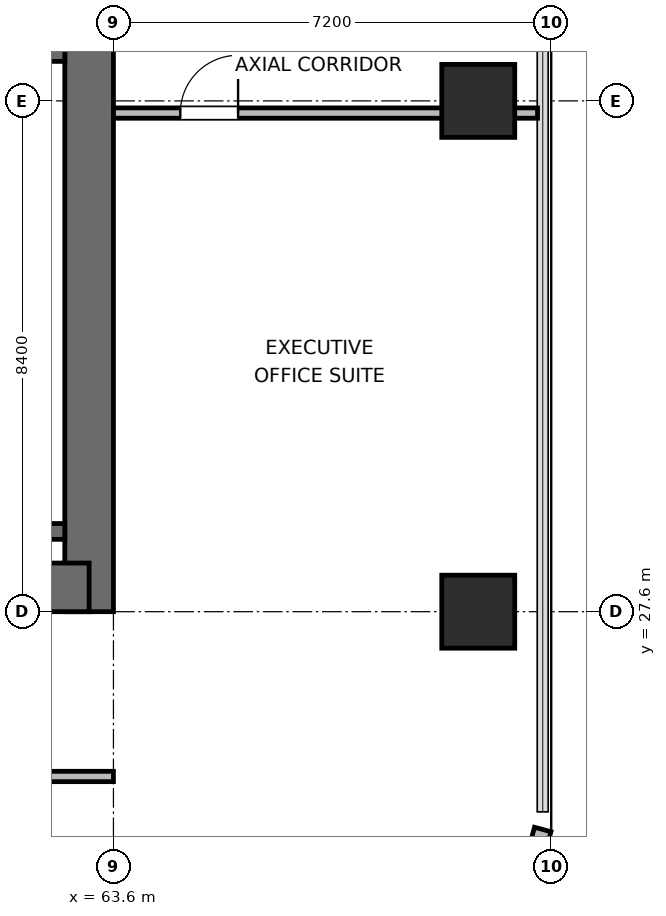
"""IFC4 building model, lengths in metres.
Left out: names, types, materials, properties, quantities, classifications, styles, units other than length and angle.
Written with IfcOpenShell. Run it as: python <this file> out.ifc"""

import sys

from ifc_helpers import new_model, si_unit, direction, frame, frame_2d, origin, origin_2d, place, context, subcontext, project, spatial, rectangle, extrude, element, fill, save


model = new_model("IFC4")
c1 = context("Model", 3, precision=1e-05, world=origin(), true_north=direction((0.0, 1.0)))
c2 = subcontext(c1, "Body", "Model", "MODEL_VIEW")
j1 = project(units=[si_unit("LENGTHUNIT", "METRE"), si_unit("PLANEANGLEUNIT", "RADIAN")], contexts=[c1])
p1 = place(None, origin())
s1 = spatial("IfcSite", under=j1, at=p1, CompositionType="ELEMENT")
p2 = place(p1, origin())
s2 = spatial("IfcBuilding", under=s1, at=p2, CompositionType="ELEMENT")
p3 = place(p2, frame((0.0, 0.0, 162.3)))
s3 = spatial("IfcBuildingStorey", under=s2, at=p3, CompositionType="ELEMENT", Elevation=162.3)
p4 = place(p3, frame((63.2, 27.6, 0.0), z_axis=(0.0, 0.0, 1.0), x_axis=(0.0, 1.0, 0.0)))
e1 = element("IfcWall", 1, at=p4, inside=s3, PredefinedType="SHEAR", context=c2, shape_type="SweptSolid", body=[
    extrude(rectangle(XDim=16.8, YDim=0.8, at=frame_2d((8.4, 0.0))), origin(), (0.0, 0.0, 1.0), 3.9),
])
p5 = place(p3, frame((54.0, 28.0, 0.0), z_axis=(0.0, 0.0, 1.0), x_axis=(1.0, 0.0, 0.0)))
e2 = element("IfcWall", 2, at=p5, inside=s3, PredefinedType="SHEAR", context=c2, shape_type="SweptSolid", body=[
    extrude(rectangle(XDim=9.2, YDim=0.8, at=frame_2d((4.6, 0.0))), origin(), (0.0, 0.0, 1.0), 3.9),
])
p6 = place(p5, frame((3.975, 0.0, 0.0)))
e3 = element("IfcOpeningElement", 3, at=p6, cuts=e2, PredefinedType="OPENING", context=c2, shape_type="SweptSolid", body=[
    extrude(rectangle(XDim=1.05, YDim=2.04, at=frame_2d((0.525, 1.02))), frame((0.0, 0.41, 0.0), z_axis=(0.0, -1.0, 0.0), x_axis=(1.0, 0.0, 0.0)), (0.0, 0.0, 1.0), 0.82),
])
for number, where, z_axis, x_axis in (
    (4, (58.89, 28.92, 0.0), (0.0, 0.0, 1.0), (1.0, 0.0, 0.0)),
    (5, (58.89, 36.78, 0.0), (0.0, 0.0, 1.0), (1.0, 0.0, 0.0)),
):
    element("IfcWall", number, at=place(p3, frame(where, z_axis=z_axis, x_axis=x_axis)), inside=s3, PredefinedType="SHEAR", context=c2, shape_type="SweptSolid", body=[
        extrude(rectangle(XDim=3.91, YDim=0.26, at=frame_2d((1.955, 0.0))), origin(), (0.0, 0.0, 1.0), 3.9),
    ])
for number, where, z_axis, x_axis in (
    (6, (69.6, 27.6, 0.0), (0.0, 0.0, 1.0), (1.0, 0.0, 0.0)),
    (7, (69.6, 36.0, 0.0), (0.0, 0.0, 1.0), (1.0, 0.0, 0.0)),
):
    element("IfcColumn", number, at=place(p3, frame(where, z_axis=z_axis, x_axis=x_axis)), inside=s3, PredefinedType="COLUMN", context=c2, shape_type="SweptSolid", body=[
        extrude(rectangle(XDim=1.2, YDim=1.2, at=origin_2d()), origin(), (0.0, 0.0, 1.0), 3.9),
    ])
p7 = place(p3, frame((70.66, 24.018, 0.0), z_axis=(0.0, 0.0, 1.0), x_axis=(-0.258672222976, -0.9659651552, 0.0)))
e8 = element("IfcWall", 8, at=p7, inside=s3, PredefinedType="SOLIDWALL", context=c2, shape_type="SweptSolid", body=[
    extrude(rectangle(XDim=2.739, YDim=0.28, at=frame_2d((1.37, 0.0))), origin(), (0.0, 0.0, 1.0), 3.68),
])
p8 = place(p3, frame((29.8, 24.89, 0.0), z_axis=(0.0, 0.0, 1.0), x_axis=(1.0, 0.0, 0.0)))
e9 = element("IfcWall", 9, at=p8, inside=s3, PredefinedType="PARTITIONING", context=c2, shape_type="SweptSolid", body=[
    extrude(rectangle(XDim=33.8, YDim=0.17, at=frame_2d((16.9, 0.0))), origin(), (0.0, 0.0, 1.0), 3.68),
])
p9 = place(p8, frame((2.37, 0.0, 0.0)))
e10 = element("IfcOpeningElement", 10, at=p9, cuts=e9, PredefinedType="OPENING", context=c2, shape_type="SweptSolid", body=[
    extrude(rectangle(XDim=0.95, YDim=2.04, at=frame_2d((0.475, 1.02))), frame((0.0, 0.095, 0.0), z_axis=(0.0, -1.0, 0.0), x_axis=(1.0, 0.0, 0.0)), (0.0, 0.0, 1.0), 0.19),
])
p10 = place(p8, frame((7.455, 0.0, 0.0)))
e11 = element("IfcOpeningElement", 11, at=p10, cuts=e9, PredefinedType="OPENING", context=c2, shape_type="SweptSolid", body=[
    extrude(rectangle(XDim=0.95, YDim=2.04, at=frame_2d((0.475, 1.02))), frame((0.0, 0.095, 0.0), z_axis=(0.0, -1.0, 0.0), x_axis=(1.0, 0.0, 0.0)), (0.0, 0.0, 1.0), 0.19),
])
p11 = place(p8, frame((11.51, 0.0, 0.0)))
e12 = element("IfcOpeningElement", 12, at=p11, cuts=e9, PredefinedType="OPENING", context=c2, shape_type="SweptSolid", body=[
    extrude(rectangle(XDim=0.95, YDim=2.04, at=frame_2d((0.475, 1.02))), frame((0.0, 0.095, 0.0), z_axis=(0.0, -1.0, 0.0), x_axis=(1.0, 0.0, 0.0)), (0.0, 0.0, 1.0), 0.19),
])
p12 = place(p8, frame((15.995, 0.0, 0.0)))
e13 = element("IfcOpeningElement", 13, at=p12, cuts=e9, PredefinedType="OPENING", context=c2, shape_type="SweptSolid", body=[
    extrude(rectangle(XDim=0.95, YDim=2.04, at=frame_2d((0.475, 1.02))), frame((0.0, 0.095, 0.0), z_axis=(0.0, -1.0, 0.0), x_axis=(1.0, 0.0, 0.0)), (0.0, 0.0, 1.0), 0.19),
])
p13 = place(p8, frame((20.91, 0.0, 0.0)))
e14 = element("IfcOpeningElement", 14, at=p13, cuts=e9, PredefinedType="OPENING", context=c2, shape_type="SweptSolid", body=[
    extrude(rectangle(XDim=0.95, YDim=2.04, at=frame_2d((0.475, 1.02))), frame((0.0, 0.095, 0.0), z_axis=(0.0, -1.0, 0.0), x_axis=(1.0, 0.0, 0.0)), (0.0, 0.0, 1.0), 0.19),
])
p14 = place(p8, frame((25.395, 0.0, 0.0)))
e15 = element("IfcOpeningElement", 15, at=p14, cuts=e9, PredefinedType="OPENING", context=c2, shape_type="SweptSolid", body=[
    extrude(rectangle(XDim=0.95, YDim=2.04, at=frame_2d((0.475, 1.02))), frame((0.0, 0.095, 0.0), z_axis=(0.0, -1.0, 0.0), x_axis=(1.0, 0.0, 0.0)), (0.0, 0.0, 1.0), 0.19),
])
p15 = place(p8, frame((30.48, 0.0, 0.0)))
e16 = element("IfcOpeningElement", 16, at=p15, cuts=e9, PredefinedType="OPENING", context=c2, shape_type="SweptSolid", body=[
    extrude(rectangle(XDim=0.95, YDim=2.04, at=frame_2d((0.475, 1.02))), frame((0.0, 0.095, 0.0), z_axis=(0.0, -1.0, 0.0), x_axis=(1.0, 0.0, 0.0)), (0.0, 0.0, 1.0), 0.19),
])
p16 = place(p3, frame((63.6, 35.8, 0.0), z_axis=(0.0, 0.0, 1.0), x_axis=(1.0, 0.0, 0.0)))
e17 = element("IfcWall", 17, at=p16, inside=s3, PredefinedType="PARTITIONING", context=c2, shape_type="SweptSolid", body=[
    extrude(rectangle(XDim=6.975, YDim=0.17, at=frame_2d((3.487, 0.0))), origin(), (0.0, 0.0, 1.0), 3.043),
])
p17 = place(p16, frame((1.1, 0.0, 0.0)))
e18 = element("IfcOpeningElement", 18, at=p17, cuts=e17, PredefinedType="OPENING", context=c2, shape_type="SweptSolid", body=[
    extrude(rectangle(XDim=0.95, YDim=2.04, at=frame_2d((0.475, 1.02))), frame((0.0, 0.095, 0.0), z_axis=(0.0, -1.0, 0.0), x_axis=(1.0, 0.0, 0.0)), (0.0, 0.0, 1.0), 0.19),
])
p18 = place(p17, origin())
e19 = element("IfcDoor", 19, at=p18, inside=s3, OperationType="SINGLE_SWING_RIGHT", PredefinedType="DOOR", context=c2, shape_type="SweptSolid", body=[
    extrude(rectangle(XDim=0.95, YDim=2.04, at=frame_2d((0.475, 1.02))), frame((0.0, 0.025, 0.0), z_axis=(0.0, -1.0, 0.0), x_axis=(1.0, 0.0, 0.0)), (0.0, 0.0, 1.0), 0.05),
])
fill(e18, e19)
save(model, sys.argv[1])
